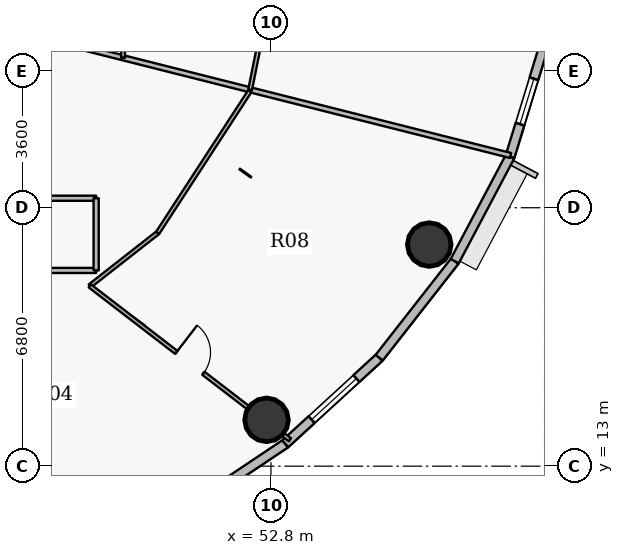
"""IFC4 building model, lengths in metres.
Left out: names, types, materials, properties, quantities, classifications, styles, units other than length and angle.
Written with IfcOpenShell. Run it as: python <this file> out.ifc"""

import sys

from ifc_helpers import new_model, si_unit, direction, frame, frame_2d, origin, origin_2d, place, context, subcontext, project, spatial, rectangle, hollow_circle, extrude, source, transform, mapped, element, fill, save


model = new_model("IFC4")
c1 = context("Model", 3, precision=1e-05, world=origin(), true_north=direction((0.0, 1.0)))
c2 = subcontext(c1, "Body", "Model", "MODEL_VIEW")
j1 = project(units=[si_unit("LENGTHUNIT", "METRE"), si_unit("PLANEANGLEUNIT", "RADIAN")], contexts=[c1])
p1 = place(None, origin())
s1 = spatial("IfcSite", under=j1, at=p1, CompositionType="ELEMENT")
p2 = place(p1, origin())
s2 = spatial("IfcBuilding", under=s1, at=p2, CompositionType="ELEMENT")
p3 = place(p2, frame((0.0, 0.0, 251.55)))
s3 = spatial("IfcBuildingStorey", under=s2, at=p3, CompositionType="ELEMENT", Elevation=251.55)
for number, where, z_axis, x_axis in (
    (1, (52.683, 14.219, 0.0), (0.0, 0.0, 1.0), (1.0, 0.0, 0.0)),
    (2, (56.965, 18.831, 0.0), (0.0, 0.0, 1.0), (1.0, 0.0, 0.0)),
):
    element("IfcColumn", number, at=place(p3, frame(where, z_axis=z_axis, x_axis=x_axis)), inside=s3, PredefinedType="COLUMN", context=c2, shape_type="SweptSolid", body=[
        extrude(hollow_circle(Radius=0.575, WallThickness=0.036, at=origin_2d()), origin(), (0.0, 0.0, 1.0), 3.75),
    ])
p4 = place(p3, frame((53.176, 13.589, 0.0), z_axis=(0.0, 0.0, 1.0), x_axis=(-0.831262496074, -0.555880079352, 0.0)))
e3 = element("IfcWall", 3, at=p4, inside=s3, PredefinedType="SOLIDWALL", context=c2, shape_type="SweptSolid", body=[
    extrude(rectangle(XDim=3.484, YDim=0.24, at=frame_2d((1.742, 0.0))), origin(), (0.0, 0.0, 1.0), 3.5),
])
p5 = place(p3, frame((55.648, 15.855, 0.0), z_axis=(0.0, 0.0, 1.0), x_axis=(-0.737123922599, -0.675757591694, 0.0)))
e4 = element("IfcWall", 4, at=p5, inside=s3, PredefinedType="SOLIDWALL", context=c2, shape_type="SweptSolid", body=[
    extrude(rectangle(XDim=3.354, YDim=0.24, at=frame_2d((1.677, 0.0))), origin(), (0.0, 0.0, 1.0), 3.5),
])
p6 = place(p5, frame((0.813, 0.0, 0.9)))
e5 = element("IfcOpeningElement", 5, at=p6, cuts=e4, PredefinedType="OPENING", context=c2, shape_type="SweptSolid", body=[
    extrude(rectangle(XDim=1.6, YDim=1.75, at=origin_2d()), frame((0.8, 0.13, 0.875), z_axis=(0.0, -1.0, 0.0), x_axis=(1.0, 0.0, 0.0)), (0.0, 0.0, 1.0), 0.26),
])
p7 = place(p3, frame((57.636, 18.395, 0.0), z_axis=(0.0, 0.0, 1.0), x_axis=(-0.616312344705, -0.787501805562, 0.0)))
e6 = element("IfcWall", 6, at=p7, inside=s3, PredefinedType="SOLIDWALL", context=c2, shape_type="SweptSolid", body=[
    extrude(rectangle(XDim=3.225, YDim=0.24, at=frame_2d((1.612, 0.0))), origin(), (0.0, 0.0, 1.0), 3.5),
])
p8 = place(p3, frame((59.09, 21.144, 0.0), z_axis=(0.0, 0.0, 1.0), x_axis=(-0.46766049993, -0.883908172157, 0.0)))
e7 = element("IfcWall", 7, at=p8, inside=s3, PredefinedType="SOLIDWALL", context=c2, shape_type="SweptSolid", body=[
    extrude(rectangle(XDim=3.11, YDim=0.24, at=frame_2d((1.555, 0.0))), origin(), (0.0, 0.0, 1.0), 3.5),
])
p9 = place(p3, frame((59.977, 24.036, 0.0), z_axis=(0.0, 0.0, 1.0), x_axis=(-0.293132907334, -0.95607170162, 0.0)))
e8 = element("IfcWall", 8, at=p9, inside=s3, PredefinedType="SOLIDWALL", context=c2, shape_type="SweptSolid", body=[
    extrude(rectangle(XDim=3.025, YDim=0.24, at=frame_2d((1.512, 0.0))), origin(), (0.0, 0.0, 1.0), 3.5),
])
p10 = place(p9, frame((0.88, 0.0, 0.9)))
e9 = element("IfcOpeningElement", 9, at=p10, cuts=e8, PredefinedType="OPENING", context=c2, shape_type="SweptSolid", body=[
    extrude(rectangle(XDim=1.25, YDim=1.65, at=origin_2d()), frame((0.625, 0.13, 0.825), z_axis=(0.0, -1.0, 0.0), x_axis=(1.0, 0.0, 0.0)), (0.0, 0.0, 1.0), 0.26),
])
p11 = place(p3, frame((24.35, 18.15, 0.0), z_axis=(0.0, 0.0, 1.0), x_axis=(1.0, 0.0, 0.0)))
e10 = element("IfcWall", 10, at=p11, inside=s3, PredefinedType="PARTITIONING", context=c2, shape_type="SweptSolid", body=[
    extrude(rectangle(XDim=23.85, YDim=0.135, at=frame_2d((11.925, 0.0))), origin(), (0.0, 0.0, 1.0), 2.935),
])
p12 = place(p11, frame((6.069, 0.0, 0.0)))
e11 = element("IfcOpeningElement", 11, at=p12, cuts=e10, PredefinedType="OPENING", context=c2, shape_type="SweptSolid", body=[
    extrude(rectangle(XDim=1.0, YDim=2.15, at=origin_2d()), frame((0.5, 0.078, 1.075), z_axis=(0.0, -1.0, 0.0), x_axis=(1.0, 0.0, 0.0)), (0.0, 0.0, 1.0), 0.155),
])
p13 = place(p11, frame((19.505, 0.0, 0.0)))
e12 = element("IfcOpeningElement", 12, at=p13, cuts=e10, PredefinedType="OPENING", context=c2, shape_type="SweptSolid", body=[
    extrude(rectangle(XDim=1.0, YDim=2.15, at=origin_2d()), frame((0.5, 0.078, 1.075), z_axis=(0.0, -1.0, 0.0), x_axis=(1.0, 0.0, 0.0)), (0.0, 0.0, 1.0), 0.155),
])
p14 = place(p3, frame((45.8, 20.05, 0.0), z_axis=(0.0, 0.0, 1.0), x_axis=(1.0, 0.0, 0.0)))
e13 = element("IfcWall", 13, at=p14, inside=s3, PredefinedType="PARTITIONING", context=c2, shape_type="SweptSolid", body=[
    extrude(rectangle(XDim=2.4, YDim=0.135, at=frame_2d((1.2, 0.0))), origin(), (0.0, 0.0, 1.0), 3.5),
])
p15 = place(p3, frame((46.215, 24.425, 0.0), z_axis=(0.0, 0.0, 1.0), x_axis=(0.969657665326, -0.244466791355, 0.0)))
e14 = element("IfcWall", 14, at=p15, inside=s3, PredefinedType="PARTITIONING", context=c2, shape_type="SweptSolid", body=[
    extrude(rectangle(XDim=13.293, YDim=0.135, at=frame_2d((6.646, 0.0))), origin(), (0.0, 0.0, 1.0), 2.985),
])
p16 = place(p3, frame((48.034, 17.743, 0.0), z_axis=(0.0, 0.0, 1.0), x_axis=(0.787427677995, 0.616407050517, 0.0)))
e15 = element("IfcWall", 15, at=p16, inside=s3, PredefinedType="PARTITIONING", context=c2, shape_type="SweptSolid", body=[
    extrude(rectangle(XDim=2.266, YDim=0.1, at=frame_2d((1.133, 0.0))), origin(), (0.0, 0.0, 1.0), 2.935),
])
p17 = place(p3, frame((48.034, 17.743, 0.0), z_axis=(0.0, 0.0, 1.0), x_axis=(0.792617155724, -0.609719644141, 0.0)))
e16 = element("IfcWall", 16, at=p17, inside=s3, PredefinedType="PARTITIONING", context=c2, shape_type="SweptSolid", body=[
    extrude(rectangle(XDim=6.641, YDim=0.1, at=frame_2d((3.32, 0.0))), origin(), (0.0, 0.0, 1.0), 2.935),
])
p18 = place(p17, frame((2.87, 0.0, 0.0)))
e17 = element("IfcOpeningElement", 17, at=p18, cuts=e16, PredefinedType="OPENING", context=c2, shape_type="SweptSolid", body=[
    extrude(rectangle(XDim=0.9, YDim=2.1, at=origin_2d()), frame((0.45, 0.06, 1.05), z_axis=(0.0, -1.0, 0.0), x_axis=(1.0, 0.0, 0.0)), (0.0, 0.0, 1.0), 0.12),
])
p19 = place(p3, frame((48.2, 18.15, 0.0), z_axis=(0.0, 0.0, 1.0), x_axis=(0.0, 1.0, 0.0)))
e18 = element("IfcWall", 18, at=p19, inside=s3, PredefinedType="PARTITIONING", context=c2, shape_type="SweptSolid", body=[
    extrude(rectangle(XDim=1.9, YDim=0.135, at=frame_2d((0.95, 0.0))), origin(), (0.0, 0.0, 1.0), 3.5),
])
p20 = place(p3, frame((48.908, 23.746, 0.0), z_axis=(0.0, 0.0, 1.0), x_axis=(0.0, 1.0, 0.0)))
e19 = element("IfcWall", 19, at=p20, inside=s3, PredefinedType="PARTITIONING", context=c2, shape_type="SweptSolid", body=[
    extrude(rectangle(XDim=10.204, YDim=0.1, at=frame_2d((5.102, 0.0))), origin(), (0.0, 0.0, 1.0), 2.935),
])
p21 = place(p20, frame((4.652, 0.0, 0.0)))
e20 = element("IfcOpeningElement", 20, at=p21, cuts=e19, PredefinedType="OPENING", context=c2, shape_type="SweptSolid", body=[
    extrude(rectangle(XDim=0.9, YDim=2.1, at=origin_2d()), frame((0.45, 0.06, 1.05), z_axis=(0.0, -1.0, 0.0), x_axis=(1.0, 0.0, 0.0)), (0.0, 0.0, 1.0), 0.12),
])
p22 = place(p3, frame((49.818, 19.139, 0.0), z_axis=(0.0, 0.0, 1.0), x_axis=(0.545406924684, 0.83817139447, 0.0)))
e21 = element("IfcWall", 21, at=p22, inside=s3, PredefinedType="PARTITIONING", context=c2, shape_type="SweptSolid", body=[
    extrude(rectangle(XDim=4.448, YDim=0.1, at=frame_2d((2.224, 0.0))), origin(), (0.0, 0.0, 1.0), 2.935),
])
p23 = place(p3, frame((52.251, 22.903, 0.0), z_axis=(0.0, 0.0, 1.0), x_axis=(0.198227662963, 0.980156004744, 0.0)))
e22 = element("IfcWall", 22, at=p23, inside=s3, PredefinedType="PARTITIONING", context=c2, shape_type="SweptSolid", body=[
    extrude(rectangle(XDim=4.024, YDim=0.1, at=frame_2d((2.012, 0.0))), origin(), (0.0, 0.0, 1.0), 2.935),
])
p24 = place(p23, frame((1.562, 0.0, 0.0)))
e23 = element("IfcOpeningElement", 23, at=p24, cuts=e22, PredefinedType="OPENING", context=c2, shape_type="SweptSolid", body=[
    extrude(rectangle(XDim=0.9, YDim=2.1, at=origin_2d()), frame((0.45, 0.06, 1.05), z_axis=(0.0, -1.0, 0.0), x_axis=(1.0, 0.0, 0.0)), (0.0, 0.0, 1.0), 0.12),
])
m1 = source(origin(), c2, "Body", "SweptSolid", [
    extrude(rectangle(XDim=1.6, YDim=1.75, at=origin_2d()), frame((0.8, 0.03, 0.875), z_axis=(0.0, -1.0, 0.0), x_axis=(1.0, 0.0, 0.0)), (0.0, 0.0, 1.0), 0.06),
])
p25 = place(p6, origin())
e24 = element("IfcWindow", 24, at=p25, inside=s3, PartitioningType="DOUBLE_PANEL_VERTICAL", PredefinedType="WINDOW", context=c2, shape_type="MappedRepresentation", body=[
    mapped(m1, transform((0.0, 0.0, 0.0), x_axis=(1.0, 0.0, 0.0), y_axis=(0.0, 1.0, 0.0), z_axis=(0.0, 0.0, 1.0), scale=1.0)),
])
fill(e5, e24)
m2 = source(origin(), c2, "Body", "SweptSolid", [
    extrude(rectangle(XDim=1.25, YDim=1.65, at=origin_2d()), frame((0.625, 0.03, 0.825), z_axis=(0.0, -1.0, 0.0), x_axis=(1.0, 0.0, 0.0)), (0.0, 0.0, 1.0), 0.06),
])
p26 = place(p10, origin())
e25 = element("IfcWindow", 25, at=p26, inside=s3, PartitioningType="SINGLE_PANEL", PredefinedType="WINDOW", context=c2, shape_type="MappedRepresentation", body=[
    mapped(m2, transform((0.0, 0.0, 0.0), x_axis=(1.0, 0.0, 0.0), y_axis=(0.0, 1.0, 0.0), z_axis=(0.0, 0.0, 1.0), scale=1.0)),
])
fill(e9, e25)
m3 = source(origin(), c2, "Body", "SweptSolid", [
    extrude(rectangle(XDim=0.9, YDim=2.1, at=origin_2d()), frame((0.45, 0.025, 1.05), z_axis=(0.0, -1.0, 0.0), x_axis=(1.0, 0.0, 0.0)), (0.0, 0.0, 1.0), 0.05),
])
p27 = place(p18, origin())
e26 = element("IfcDoor", 26, at=p27, inside=s3, OperationType="SINGLE_SWING_LEFT", PredefinedType="DOOR", context=c2, shape_type="MappedRepresentation", body=[
    mapped(m3, transform((0.0, 0.0, 0.0), x_axis=(1.0, 0.0, 0.0), y_axis=(0.0, 1.0, 0.0), z_axis=(0.0, 0.0, 1.0), scale=1.0)),
])
fill(e17, e26)
save(model, sys.argv[1])
